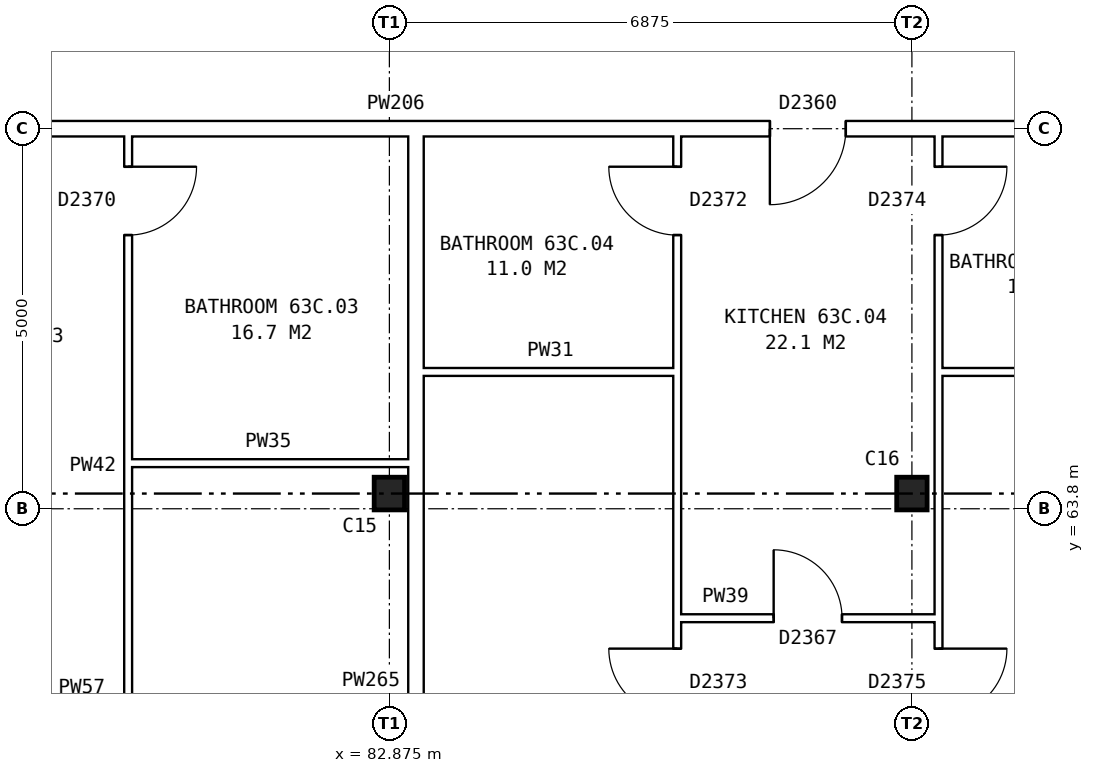
"""IFC4 building model, lengths in metres.
Left out: names, types, materials, properties, quantities, classifications, styles, units other than length and angle.
Written with IfcOpenShell. Run it as: python <this file> out.ifc"""

import sys

from ifc_helpers import new_model, si_unit, direction, frame, frame_2d, origin, origin_2d, place, context, subcontext, project, spatial, rectangle, i_section, extrude, element, fill, save


model = new_model("IFC4")
c1 = context("Model", 3, precision=1e-05, world=origin(), true_north=direction((0.0, 1.0)))
c2 = subcontext(c1, "Body", "Model", "MODEL_VIEW")
j1 = project(units=[si_unit("LENGTHUNIT", "METRE"), si_unit("PLANEANGLEUNIT", "RADIAN")], contexts=[c1])
p1 = place(None, origin())
s1 = spatial("IfcSite", under=j1, at=p1, CompositionType="ELEMENT")
p2 = place(p1, origin())
s2 = spatial("IfcBuilding", under=s1, at=p2, CompositionType="ELEMENT")
p3 = place(p2, frame((0.0, 0.0, 224.5)))
s3 = spatial("IfcBuildingStorey", under=s2, at=p3, CompositionType="ELEMENT", Elevation=224.5)
for number, where, z_axis, x_axis in (
    (1, (82.875, 64.0, 0.0), (0.0, 0.0, 1.0), (1.0, 0.0, 0.0)),
    (2, (89.75, 64.0, 0.0), (0.0, 0.0, 1.0), (1.0, 0.0, 0.0)),
):
    element("IfcColumn", number, at=place(p3, frame(where, z_axis=z_axis, x_axis=x_axis)), inside=s3, PredefinedType="COLUMN", context=c2, shape_type="SweptSolid", body=[
        extrude(i_section(OverallWidth=0.4, OverallDepth=0.43, WebThickness=0.04, FlangeThickness=0.04, at=origin_2d()), origin(), (0.0, 0.0, 1.0), 2.85),
    ])
p4 = place(p3, frame((86.662, 62.36, 0.0), z_axis=(0.0, 0.0, 1.0), x_axis=(1.0, 0.0, 0.0)))
e3 = element("IfcWall", 3, at=p4, inside=s3, PredefinedType="PARTITIONING", context=c2, shape_type="SweptSolid", body=[
    extrude(rectangle(XDim=3.438, YDim=0.1, at=frame_2d((1.719, 0.0))), origin(), (0.0, 0.0, 1.0), 2.85),
])
p5 = place(p4, frame((1.269, 0.0, 0.0)))
e4 = element("IfcOpeningElement", 4, at=p5, cuts=e3, PredefinedType="OPENING", context=c2, shape_type="SweptSolid", body=[
    extrude(rectangle(XDim=0.9, YDim=2.1, at=frame_2d((0.45, 1.05))), frame((0.0, 0.06, 0.0), z_axis=(0.0, -1.0, 0.0), x_axis=(1.0, 0.0, 0.0)), (0.0, 0.0, 1.0), 0.12),
])
p6 = place(p3, frame((79.438, 64.4, 0.0), z_axis=(0.0, 0.0, 1.0), x_axis=(1.0, 0.0, 0.0)))
e5 = element("IfcWall", 5, at=p6, inside=s3, PredefinedType="PARTITIONING", context=c2, shape_type="SweptSolid", body=[
    extrude(rectangle(XDim=3.687, YDim=0.1, at=frame_2d((1.844, 0.0))), origin(), (0.0, 0.0, 1.0), 2.85),
])
p7 = place(p3, frame((83.325, 65.6, 0.0), z_axis=(0.0, 0.0, 1.0), x_axis=(1.0, 0.0, 0.0)))
e6 = element("IfcWall", 6, at=p7, inside=s3, PredefinedType="PARTITIONING", context=c2, shape_type="SweptSolid", body=[
    extrude(rectangle(XDim=3.337, YDim=0.1, at=frame_2d((1.668, 0.0))), origin(), (0.0, 0.0, 1.0), 2.85),
])
p8 = place(p3, frame((90.1, 65.6, 0.0), z_axis=(0.0, 0.0, 1.0), x_axis=(1.0, 0.0, 0.0)))
e7 = element("IfcWall", 7, at=p8, inside=s3, PredefinedType="PARTITIONING", context=c2, shape_type="SweptSolid", body=[
    extrude(rectangle(XDim=6.875, YDim=0.1, at=frame_2d((3.438, 0.0))), origin(), (0.0, 0.0, 1.0), 2.85),
])
p9 = place(p3, frame((75.64, 68.8, 0.0), z_axis=(0.0, 0.0, 1.0), x_axis=(1.0, 0.0, 0.0)))
e8 = element("IfcWall", 8, at=p9, inside=s3, PredefinedType="PARTITIONING", context=c2, shape_type="SweptSolid", body=[
    extrude(rectangle(XDim=55.72, YDim=0.2, at=frame_2d((27.86, 0.0))), origin(), (0.0, 0.0, 1.0), 2.85),
])
p10 = place(p9, frame((1.399, 0.0, 0.0)))
e9 = element("IfcOpeningElement", 9, at=p10, cuts=e8, PredefinedType="OPENING", context=c2, shape_type="SweptSolid", body=[
    extrude(rectangle(XDim=1.0, YDim=2.1, at=frame_2d((0.5, 1.05))), frame((0.0, 0.11, 0.0), z_axis=(0.0, -1.0, 0.0), x_axis=(1.0, 0.0, 0.0)), (0.0, 0.0, 1.0), 0.22),
])
p11 = place(p9, frame((12.241, 0.0, 0.0)))
e10 = element("IfcOpeningElement", 10, at=p11, cuts=e8, PredefinedType="OPENING", context=c2, shape_type="SweptSolid", body=[
    extrude(rectangle(XDim=1.0, YDim=2.1, at=frame_2d((0.5, 1.05))), frame((0.0, 0.11, 0.0), z_axis=(0.0, -1.0, 0.0), x_axis=(1.0, 0.0, 0.0)), (0.0, 0.0, 1.0), 0.22),
])
p12 = place(p9, frame((22.553, 0.0, 0.0)))
e11 = element("IfcOpeningElement", 11, at=p12, cuts=e8, PredefinedType="OPENING", context=c2, shape_type="SweptSolid", body=[
    extrude(rectangle(XDim=1.0, YDim=2.1, at=frame_2d((0.5, 1.05))), frame((0.0, 0.11, 0.0), z_axis=(0.0, -1.0, 0.0), x_axis=(1.0, 0.0, 0.0)), (0.0, 0.0, 1.0), 0.22),
])
p13 = place(p9, frame((32.866, 0.0, 0.0)))
e12 = element("IfcOpeningElement", 12, at=p13, cuts=e8, PredefinedType="OPENING", context=c2, shape_type="SweptSolid", body=[
    extrude(rectangle(XDim=1.0, YDim=2.1, at=frame_2d((0.5, 1.05))), frame((0.0, 0.11, 0.0), z_axis=(0.0, -1.0, 0.0), x_axis=(1.0, 0.0, 0.0)), (0.0, 0.0, 1.0), 0.22),
])
p14 = place(p9, frame((36.303, 0.0, 0.0)))
e13 = element("IfcOpeningElement", 13, at=p14, cuts=e8, PredefinedType="OPENING", context=c2, shape_type="SweptSolid", body=[
    extrude(rectangle(XDim=1.0, YDim=2.1, at=frame_2d((0.5, 1.05))), frame((0.0, 0.11, 0.0), z_axis=(0.0, -1.0, 0.0), x_axis=(1.0, 0.0, 0.0)), (0.0, 0.0, 1.0), 0.22),
])
p15 = place(p9, frame((46.616, 0.0, 0.0)))
e14 = element("IfcOpeningElement", 14, at=p15, cuts=e8, PredefinedType="OPENING", context=c2, shape_type="SweptSolid", body=[
    extrude(rectangle(XDim=1.0, YDim=2.1, at=frame_2d((0.5, 1.05))), frame((0.0, 0.11, 0.0), z_axis=(0.0, -1.0, 0.0), x_axis=(1.0, 0.0, 0.0)), (0.0, 0.0, 1.0), 0.22),
])
p16 = place(p9, frame((50.053, 0.0, 0.0)))
e15 = element("IfcOpeningElement", 15, at=p16, cuts=e8, PredefinedType="OPENING", context=c2, shape_type="SweptSolid", body=[
    extrude(rectangle(XDim=1.0, YDim=2.1, at=frame_2d((0.5, 1.05))), frame((0.0, 0.11, 0.0), z_axis=(0.0, -1.0, 0.0), x_axis=(1.0, 0.0, 0.0)), (0.0, 0.0, 1.0), 0.22),
])
p17 = place(p3, frame((79.438, 54.36, 0.0), z_axis=(0.0, 0.0, 1.0), x_axis=(0.0, 1.0, 0.0)))
e16 = element("IfcWall", 16, at=p17, inside=s3, PredefinedType="PARTITIONING", context=c2, shape_type="SweptSolid", body=[
    extrude(rectangle(XDim=14.34, YDim=0.1, at=frame_2d((7.17, 0.0))), origin(), (0.0, 0.0, 1.0), 2.85),
])
p18 = place(p17, frame((5.5, 0.0, 0.0)))
e17 = element("IfcOpeningElement", 17, at=p18, cuts=e16, PredefinedType="OPENING", context=c2, shape_type="SweptSolid", body=[
    extrude(rectangle(XDim=0.9, YDim=2.1, at=frame_2d((0.45, 1.05))), frame((0.0, 0.06, 0.0), z_axis=(0.0, -1.0, 0.0), x_axis=(1.0, 0.0, 0.0)), (0.0, 0.0, 1.0), 0.12),
])
p19 = place(p17, frame((13.04, 0.0, 0.0)))
e18 = element("IfcOpeningElement", 18, at=p19, cuts=e16, PredefinedType="OPENING", context=c2, shape_type="SweptSolid", body=[
    extrude(rectangle(XDim=0.9, YDim=2.1, at=frame_2d((0.45, 1.05))), frame((0.0, 0.06, 0.0), z_axis=(0.0, -1.0, 0.0), x_axis=(1.0, 0.0, 0.0)), (0.0, 0.0, 1.0), 0.12),
])
p20 = place(p3, frame((83.225, 54.36, 0.0), z_axis=(0.0, 0.0, 1.0), x_axis=(0.0, 1.0, 0.0)))
e19 = element("IfcWall", 19, at=p20, inside=s3, PredefinedType="PARTITIONING", context=c2, shape_type="SweptSolid", body=[
    extrude(rectangle(XDim=14.34, YDim=0.2, at=frame_2d((7.17, 0.0))), origin(), (0.0, 0.0, 1.0), 2.85),
])
p21 = place(p3, frame((86.662, 54.36, 0.0), z_axis=(0.0, 0.0, 1.0), x_axis=(0.0, 1.0, 0.0)))
e20 = element("IfcWall", 20, at=p21, inside=s3, PredefinedType="PARTITIONING", context=c2, shape_type="SweptSolid", body=[
    extrude(rectangle(XDim=14.34, YDim=0.1, at=frame_2d((7.17, 0.0))), origin(), (0.0, 0.0, 1.0), 2.85),
])
p22 = place(p21, frame((6.7, 0.0, 0.0)))
e21 = element("IfcOpeningElement", 21, at=p22, cuts=e20, PredefinedType="OPENING", context=c2, shape_type="SweptSolid", body=[
    extrude(rectangle(XDim=0.9, YDim=2.1, at=frame_2d((0.45, 1.05))), frame((0.0, 0.06, 0.0), z_axis=(0.0, -1.0, 0.0), x_axis=(1.0, 0.0, 0.0)), (0.0, 0.0, 1.0), 0.12),
])
p23 = place(p21, frame((13.04, 0.0, 0.0)))
e22 = element("IfcOpeningElement", 22, at=p23, cuts=e20, PredefinedType="OPENING", context=c2, shape_type="SweptSolid", body=[
    extrude(rectangle(XDim=0.9, YDim=2.1, at=frame_2d((0.45, 1.05))), frame((0.0, 0.06, 0.0), z_axis=(0.0, -1.0, 0.0), x_axis=(1.0, 0.0, 0.0)), (0.0, 0.0, 1.0), 0.12),
])
p24 = place(p3, frame((90.1, 54.36, 0.0), z_axis=(0.0, 0.0, 1.0), x_axis=(0.0, 1.0, 0.0)))
e23 = element("IfcWall", 23, at=p24, inside=s3, PredefinedType="PARTITIONING", context=c2, shape_type="SweptSolid", body=[
    extrude(rectangle(XDim=14.34, YDim=0.1, at=frame_2d((7.17, 0.0))), origin(), (0.0, 0.0, 1.0), 2.85),
])
p25 = place(p24, frame((6.7, 0.0, 0.0)))
e24 = element("IfcOpeningElement", 24, at=p25, cuts=e23, PredefinedType="OPENING", context=c2, shape_type="SweptSolid", body=[
    extrude(rectangle(XDim=0.9, YDim=2.1, at=frame_2d((0.45, 1.05))), frame((0.0, 0.06, 0.0), z_axis=(0.0, -1.0, 0.0), x_axis=(1.0, 0.0, 0.0)), (0.0, 0.0, 1.0), 0.12),
])
p26 = place(p24, frame((13.04, 0.0, 0.0)))
e25 = element("IfcOpeningElement", 25, at=p26, cuts=e23, PredefinedType="OPENING", context=c2, shape_type="SweptSolid", body=[
    extrude(rectangle(XDim=0.9, YDim=2.1, at=frame_2d((0.45, 1.05))), frame((0.0, 0.06, 0.0), z_axis=(0.0, -1.0, 0.0), x_axis=(1.0, 0.0, 0.0)), (0.0, 0.0, 1.0), 0.12),
])
p27 = place(p19, frame((0.9, 0.0, 0.0), z_axis=(0.0, 0.0, 1.0), x_axis=(-1.0, 0.0, 0.0)))
e26 = element("IfcDoor", 26, at=p27, inside=s3, OperationType="SINGLE_SWING_LEFT", PredefinedType="DOOR", context=c2, shape_type="SweptSolid", body=[
    extrude(rectangle(XDim=0.9, YDim=2.1, at=frame_2d((0.45, 1.05))), frame((0.0, 0.025, 0.0), z_axis=(0.0, -1.0, 0.0), x_axis=(1.0, 0.0, 0.0)), (0.0, 0.0, 1.0), 0.05),
])
fill(e18, e26)
p28 = place(p22, origin())
e27 = element("IfcDoor", 27, at=p28, inside=s3, OperationType="SINGLE_SWING_RIGHT", PredefinedType="DOOR", context=c2, shape_type="SweptSolid", body=[
    extrude(rectangle(XDim=0.9, YDim=2.1, at=frame_2d((0.45, 1.05))), frame((0.0, 0.025, 0.0), z_axis=(0.0, -1.0, 0.0), x_axis=(1.0, 0.0, 0.0)), (0.0, 0.0, 1.0), 0.05),
])
fill(e21, e27)
p29 = place(p25, frame((0.9, 0.0, 0.0), z_axis=(0.0, 0.0, 1.0), x_axis=(-1.0, 0.0, 0.0)))
e28 = element("IfcDoor", 28, at=p29, inside=s3, OperationType="SINGLE_SWING_LEFT", PredefinedType="DOOR", context=c2, shape_type="SweptSolid", body=[
    extrude(rectangle(XDim=0.9, YDim=2.1, at=frame_2d((0.45, 1.05))), frame((0.0, 0.025, 0.0), z_axis=(0.0, -1.0, 0.0), x_axis=(1.0, 0.0, 0.0)), (0.0, 0.0, 1.0), 0.05),
])
fill(e24, e28)
p30 = place(p11, frame((1.0, 0.0, 0.0), z_axis=(0.0, 0.0, 1.0), x_axis=(-1.0, 0.0, 0.0)))
e29 = element("IfcDoor", 29, at=p30, inside=s3, OperationType="SINGLE_SWING_RIGHT", PredefinedType="DOOR", context=c2, shape_type="SweptSolid", body=[
    extrude(rectangle(XDim=1.0, YDim=2.1, at=frame_2d((0.5, 1.05))), frame((0.0, 0.025, 0.0), z_axis=(0.0, -1.0, 0.0), x_axis=(1.0, 0.0, 0.0)), (0.0, 0.0, 1.0), 0.05),
])
fill(e10, e29)
p31 = place(p5, origin())
e30 = element("IfcDoor", 30, at=p31, inside=s3, OperationType="SINGLE_SWING_LEFT", PredefinedType="DOOR", context=c2, shape_type="SweptSolid", body=[
    extrude(rectangle(XDim=0.9, YDim=2.1, at=frame_2d((0.45, 1.05))), frame((0.0, 0.025, 0.0), z_axis=(0.0, -1.0, 0.0), x_axis=(1.0, 0.0, 0.0)), (0.0, 0.0, 1.0), 0.05),
])
fill(e4, e30)
p32 = place(p23, origin())
e31 = element("IfcDoor", 31, at=p32, inside=s3, OperationType="SINGLE_SWING_RIGHT", PredefinedType="DOOR", context=c2, shape_type="SweptSolid", body=[
    extrude(rectangle(XDim=0.9, YDim=2.1, at=frame_2d((0.45, 1.05))), frame((0.0, 0.025, 0.0), z_axis=(0.0, -1.0, 0.0), x_axis=(1.0, 0.0, 0.0)), (0.0, 0.0, 1.0), 0.05),
])
fill(e22, e31)
p33 = place(p26, frame((0.9, 0.0, 0.0), z_axis=(0.0, 0.0, 1.0), x_axis=(-1.0, 0.0, 0.0)))
e32 = element("IfcDoor", 32, at=p33, inside=s3, OperationType="SINGLE_SWING_LEFT", PredefinedType="DOOR", context=c2, shape_type="SweptSolid", body=[
    extrude(rectangle(XDim=0.9, YDim=2.1, at=frame_2d((0.45, 1.05))), frame((0.0, 0.025, 0.0), z_axis=(0.0, -1.0, 0.0), x_axis=(1.0, 0.0, 0.0)), (0.0, 0.0, 1.0), 0.05),
])
fill(e25, e32)
save(model, sys.argv[1])
